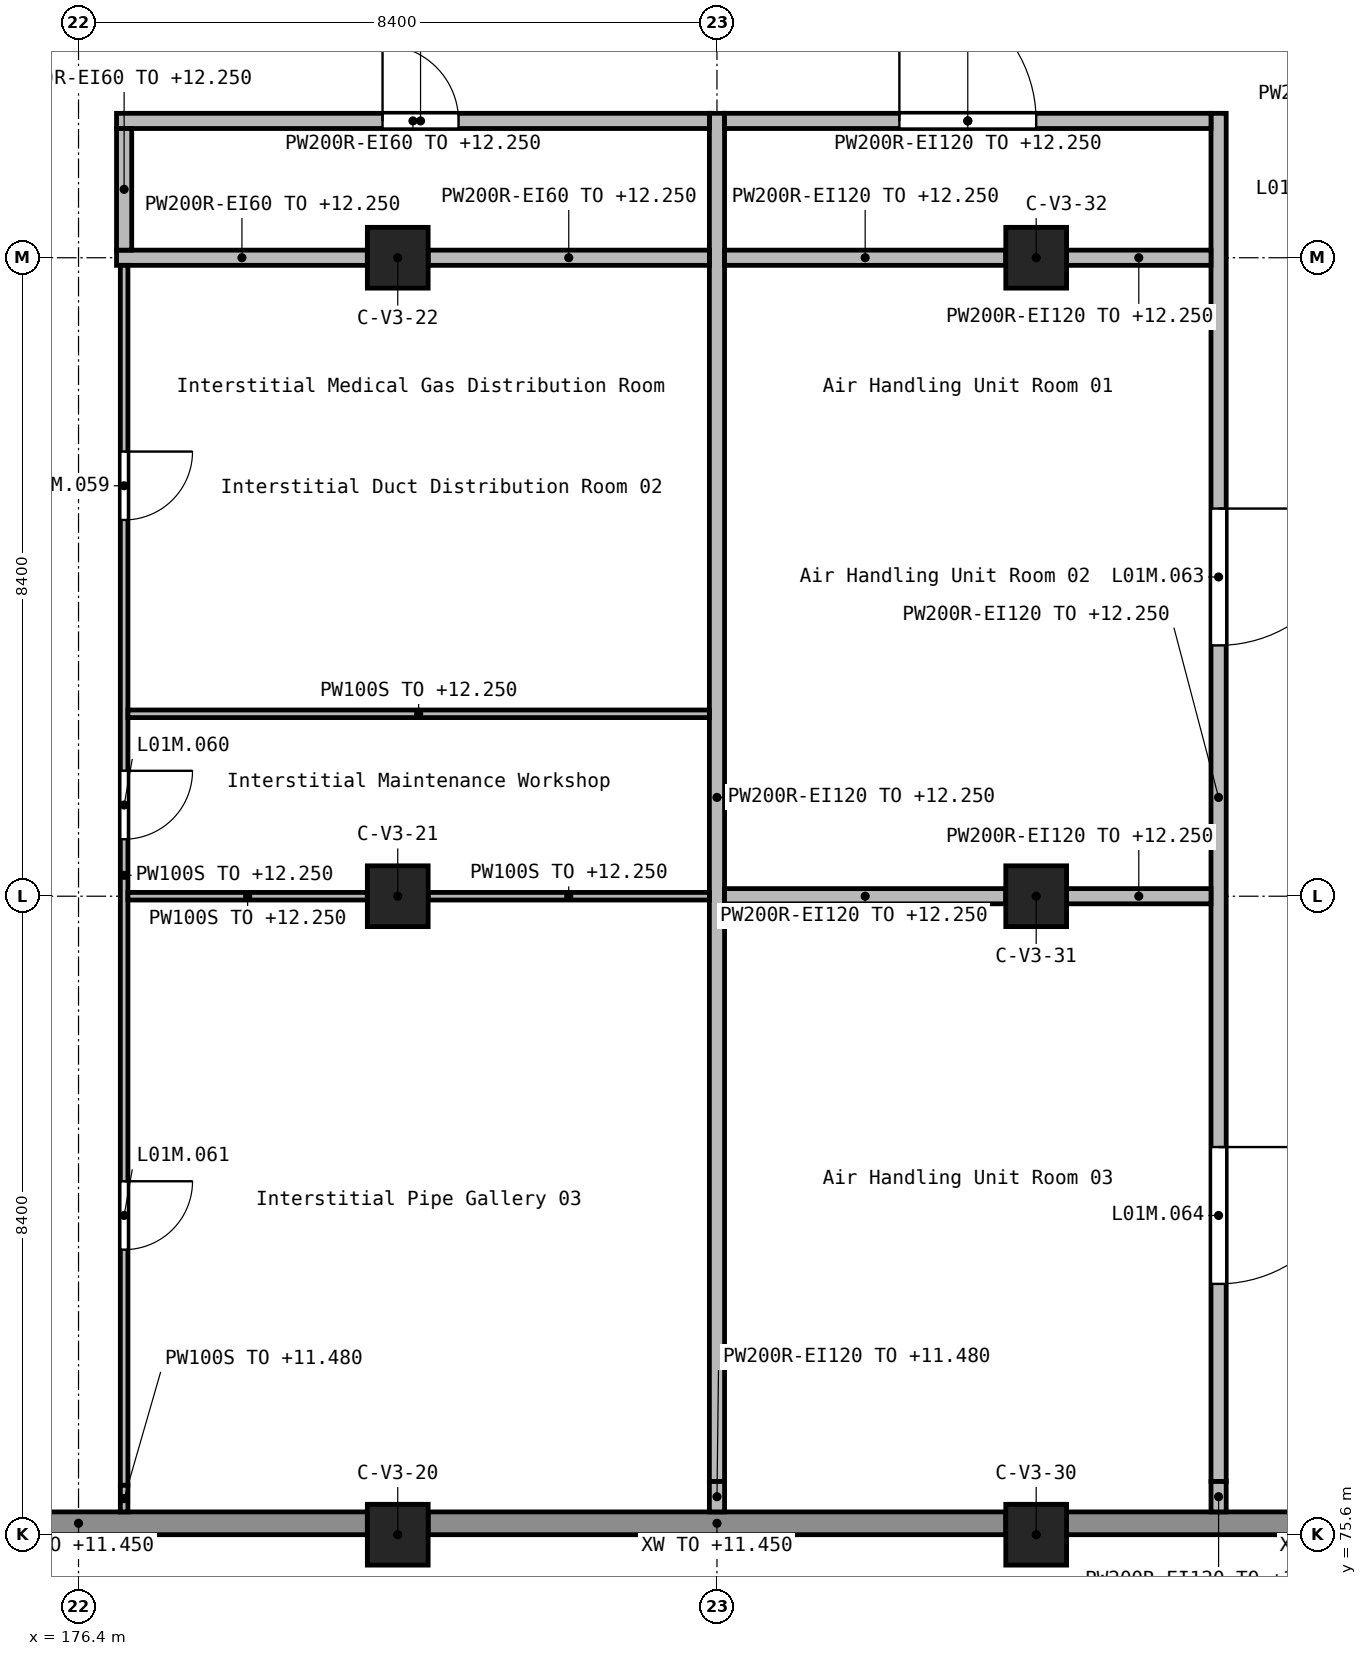
"""IFC4 building model, lengths in metres.
Left out: names, types, materials, properties, quantities, classifications, styles, units other than length and angle.
Written with IfcOpenShell. Run it as: python <this file> out.ifc"""

import sys

from ifc_helpers import new_model, si_unit, direction, frame, frame_2d, origin, origin_2d, place, context, subcontext, project, spatial, rectangle, extrude, element, fill, save


model = new_model("IFC4")
c1 = context("Model", 3, precision=1e-05, world=origin(), true_north=direction((0.0, 1.0)))
c2 = subcontext(c1, "Body", "Model", "MODEL_VIEW")
j1 = project(units=[si_unit("LENGTHUNIT", "METRE"), si_unit("PLANEANGLEUNIT", "RADIAN")], contexts=[c1])
p1 = place(None, origin())
s1 = spatial("IfcSite", under=j1, at=p1, CompositionType="ELEMENT")
p2 = place(p1, origin())
s2 = spatial("IfcBuilding", under=s1, at=p2, CompositionType="ELEMENT")
p3 = place(p2, frame((0.0, 0.0, 9.9)))
s3 = spatial("IfcBuildingStorey", under=s2, at=p3, CompositionType="ELEMENT", Elevation=9.9)
for number, where, z_axis, x_axis in (
    (1, (180.6, 75.6, 0.0), (0.0, 0.0, 1.0), (1.0, 0.0, 0.0)),
    (2, (180.6, 84.0, 0.0), (0.0, 0.0, 1.0), (1.0, 0.0, 0.0)),
    (3, (180.6, 92.4, 0.0), (0.0, 0.0, 1.0), (1.0, 0.0, 0.0)),
    (4, (189.0, 75.6, 0.0), (0.0, 0.0, 1.0), (1.0, 0.0, 0.0)),
    (5, (189.0, 84.0, 0.0), (0.0, 0.0, 1.0), (1.0, 0.0, 0.0)),
    (6, (189.0, 92.4, 0.0), (0.0, 0.0, 1.0), (1.0, 0.0, 0.0)),
):
    element("IfcColumn", number, at=place(p3, frame(where, z_axis=z_axis, x_axis=x_axis)), inside=s3, PredefinedType="COLUMN", context=c2, shape_type="SweptSolid", body=[
        extrude(rectangle(XDim=0.8, YDim=0.8, at=origin_2d()), origin(), (0.0, 0.0, 1.0), 2.7),
    ])
p4 = place(p3, frame((172.6, 75.75, 0.0), z_axis=(0.0, 0.0, 1.0), x_axis=(1.0, 0.0, 0.0)))
e7 = element("IfcWall", 7, at=p4, inside=s3, PredefinedType="STANDARD", context=c2, shape_type="SweptSolid", body=[
    extrude(rectangle(XDim=7.6, YDim=0.3, at=frame_2d((3.8, 0.0))), origin(), (0.0, 0.0, 1.0), 1.55),
])
for number, where, z_axis, x_axis in (
    (8, (181.0, 75.75, 0.0), (0.0, 0.0, 1.0), (1.0, 0.0, 0.0)),
    (9, (189.4, 75.75, 0.0), (0.0, 0.0, 1.0), (1.0, 0.0, 0.0)),
):
    element("IfcWall", number, at=place(p3, frame(where, z_axis=z_axis, x_axis=x_axis)), inside=s3, PredefinedType="STANDARD", context=c2, shape_type="SweptSolid", body=[
        extrude(rectangle(XDim=7.6, YDim=0.3, at=frame_2d((3.8, 0.0))), origin(), (0.0, 0.0, 1.0), 1.55),
    ])
p5 = place(p3, frame((184.8, 94.3, 0.0), z_axis=(0.0, 0.0, 1.0), x_axis=(0.0, -1.0, 0.0)))
e10 = element("IfcWall", 10, at=p5, inside=s3, PredefinedType="SOLIDWALL", context=c2, shape_type="SweptSolid", body=[
    extrude(rectangle(XDim=18.0, YDim=0.2, at=frame_2d((9.0, 0.0))), origin(), (0.0, 0.0, 1.0), 2.35),
])
p6 = place(p3, frame((184.8, 76.3, 0.0), z_axis=(0.0, 0.0, 1.0), x_axis=(0.0, -1.0, 0.0)))
e11 = element("IfcWall", 11, at=p6, inside=s3, PredefinedType="SOLIDWALL", context=c2, shape_type="SweptSolid", body=[
    extrude(rectangle(XDim=0.4, YDim=0.2, at=frame_2d((0.2, 0.0))), origin(), (0.0, 0.0, 1.0), 1.58),
])
p7 = place(p3, frame((191.4, 94.3, 0.0), z_axis=(0.0, 0.0, 1.0), x_axis=(0.0, -1.0, 0.0)))
e12 = element("IfcWall", 12, at=p7, inside=s3, PredefinedType="SOLIDWALL", context=c2, shape_type="SweptSolid", body=[
    extrude(rectangle(XDim=18.0, YDim=0.2, at=frame_2d((9.0, 0.0))), origin(), (0.0, 0.0, 1.0), 2.35),
])
p8 = place(p7, frame((5.2, 0.0, 0.0)))
e13 = element("IfcOpeningElement", 13, at=p8, cuts=e12, PredefinedType="OPENING", context=c2, shape_type="SweptSolid", body=[
    extrude(rectangle(XDim=1.8, YDim=2.1, at=frame_2d((0.9, 1.05))), frame((0.0, 0.11, 0.0), z_axis=(0.0, -1.0, 0.0), x_axis=(1.0, 0.0, 0.0)), (0.0, 0.0, 1.0), 0.22),
])
p9 = place(p7, frame((13.6, 0.0, 0.0)))
e14 = element("IfcOpeningElement", 14, at=p9, cuts=e12, PredefinedType="OPENING", context=c2, shape_type="SweptSolid", body=[
    extrude(rectangle(XDim=1.8, YDim=2.1, at=frame_2d((0.9, 1.05))), frame((0.0, 0.11, 0.0), z_axis=(0.0, -1.0, 0.0), x_axis=(1.0, 0.0, 0.0)), (0.0, 0.0, 1.0), 0.22),
])
p10 = place(p3, frame((191.4, 76.3, 0.0), z_axis=(0.0, 0.0, 1.0), x_axis=(0.0, -1.0, 0.0)))
e15 = element("IfcWall", 15, at=p10, inside=s3, PredefinedType="SOLIDWALL", context=c2, shape_type="SweptSolid", body=[
    extrude(rectangle(XDim=0.4, YDim=0.2, at=frame_2d((0.2, 0.0))), origin(), (0.0, 0.0, 1.0), 1.58),
])
p11 = place(p3, frame((176.9, 92.4, 0.0), z_axis=(0.0, 0.0, 1.0), x_axis=(1.0, 0.0, 0.0)))
e16 = element("IfcWall", 16, at=p11, inside=s3, PredefinedType="SOLIDWALL", context=c2, shape_type="SweptSolid", body=[
    extrude(rectangle(XDim=3.3, YDim=0.2, at=frame_2d((1.65, 0.0))), origin(), (0.0, 0.0, 1.0), 2.35),
])
p12 = place(p3, frame((181.0, 92.4, 0.0), z_axis=(0.0, 0.0, 1.0), x_axis=(1.0, 0.0, 0.0)))
e17 = element("IfcWall", 17, at=p12, inside=s3, PredefinedType="SOLIDWALL", context=c2, shape_type="SweptSolid", body=[
    extrude(rectangle(XDim=3.7, YDim=0.2, at=frame_2d((1.85, 0.0))), origin(), (0.0, 0.0, 1.0), 2.35),
])
p13 = place(p3, frame((176.9, 94.2, 0.0), z_axis=(0.0, 0.0, 1.0), x_axis=(1.0, 0.0, 0.0)))
e18 = element("IfcWall", 18, at=p13, inside=s3, PredefinedType="SOLIDWALL", context=c2, shape_type="SweptSolid", body=[
    extrude(rectangle(XDim=7.8, YDim=0.2, at=frame_2d((3.9, 0.0))), origin(), (0.0, 0.0, 1.0), 2.35),
])
p14 = place(p13, frame((3.5, 0.0, 0.0)))
e19 = element("IfcOpeningElement", 19, at=p14, cuts=e18, PredefinedType="OPENING", context=c2, shape_type="SweptSolid", body=[
    extrude(rectangle(XDim=1.0, YDim=2.1, at=frame_2d((0.5, 1.05))), frame((0.0, 0.11, 0.0), z_axis=(0.0, -1.0, 0.0), x_axis=(1.0, 0.0, 0.0)), (0.0, 0.0, 1.0), 0.22),
])
p15 = place(p3, frame((184.9, 84.0, 0.0), z_axis=(0.0, 0.0, 1.0), x_axis=(1.0, 0.0, 0.0)))
e20 = element("IfcWall", 20, at=p15, inside=s3, PredefinedType="SOLIDWALL", context=c2, shape_type="SweptSolid", body=[
    extrude(rectangle(XDim=3.7, YDim=0.2, at=frame_2d((1.85, 0.0))), origin(), (0.0, 0.0, 1.0), 2.35),
])
p16 = place(p3, frame((189.4, 84.0, 0.0), z_axis=(0.0, 0.0, 1.0), x_axis=(1.0, 0.0, 0.0)))
e21 = element("IfcWall", 21, at=p16, inside=s3, PredefinedType="SOLIDWALL", context=c2, shape_type="SweptSolid", body=[
    extrude(rectangle(XDim=1.9, YDim=0.2, at=frame_2d((0.95, 0.0))), origin(), (0.0, 0.0, 1.0), 2.35),
])
p17 = place(p3, frame((184.9, 92.4, 0.0), z_axis=(0.0, 0.0, 1.0), x_axis=(1.0, 0.0, 0.0)))
e22 = element("IfcWall", 22, at=p17, inside=s3, PredefinedType="SOLIDWALL", context=c2, shape_type="SweptSolid", body=[
    extrude(rectangle(XDim=3.7, YDim=0.2, at=frame_2d((1.85, 0.0))), origin(), (0.0, 0.0, 1.0), 2.35),
])
p18 = place(p3, frame((189.4, 92.4, 0.0), z_axis=(0.0, 0.0, 1.0), x_axis=(1.0, 0.0, 0.0)))
e23 = element("IfcWall", 23, at=p18, inside=s3, PredefinedType="SOLIDWALL", context=c2, shape_type="SweptSolid", body=[
    extrude(rectangle(XDim=1.9, YDim=0.2, at=frame_2d((0.95, 0.0))), origin(), (0.0, 0.0, 1.0), 2.35),
])
p19 = place(p3, frame((184.9, 94.2, 0.0), z_axis=(0.0, 0.0, 1.0), x_axis=(1.0, 0.0, 0.0)))
e24 = element("IfcWall", 24, at=p19, inside=s3, PredefinedType="SOLIDWALL", context=c2, shape_type="SweptSolid", body=[
    extrude(rectangle(XDim=6.4, YDim=0.2, at=frame_2d((3.2, 0.0))), origin(), (0.0, 0.0, 1.0), 2.35),
])
p20 = place(p19, frame((2.3, 0.0, 0.0)))
e25 = element("IfcOpeningElement", 25, at=p20, cuts=e24, PredefinedType="OPENING", context=c2, shape_type="SweptSolid", body=[
    extrude(rectangle(XDim=1.8, YDim=2.1, at=frame_2d((0.9, 1.05))), frame((0.0, 0.11, 0.0), z_axis=(0.0, -1.0, 0.0), x_axis=(1.0, 0.0, 0.0)), (0.0, 0.0, 1.0), 0.22),
])
p21 = place(p3, frame((177.0, 92.5, 0.0), z_axis=(0.0, 0.0, 1.0), x_axis=(0.0, 1.0, 0.0)))
e26 = element("IfcWall", 26, at=p21, inside=s3, PredefinedType="SOLIDWALL", context=c2, shape_type="SweptSolid", body=[
    extrude(rectangle(XDim=1.6, YDim=0.2, at=frame_2d((0.8, 0.0))), origin(), (0.0, 0.0, 1.0), 2.35),
])
p22 = place(p3, frame((177.0, 92.3, 0.0), z_axis=(0.0, 0.0, 1.0), x_axis=(0.0, -1.0, 0.0)))
e27 = element("IfcWall", 27, at=p22, inside=s3, PredefinedType="PARTITIONING", context=c2, shape_type="SweptSolid", body=[
    extrude(rectangle(XDim=16.05, YDim=0.1, at=frame_2d((8.025, 0.0))), origin(), (0.0, 0.0, 1.0), 2.35),
])
p23 = place(p22, frame((2.45, 0.0, 0.0)))
e28 = element("IfcOpeningElement", 28, at=p23, cuts=e27, PredefinedType="OPENING", context=c2, shape_type="SweptSolid", body=[
    extrude(rectangle(XDim=0.9, YDim=2.1, at=frame_2d((0.45, 1.05))), frame((0.0, 0.06, 0.0), z_axis=(0.0, -1.0, 0.0), x_axis=(1.0, 0.0, 0.0)), (0.0, 0.0, 1.0), 0.12),
])
p24 = place(p22, frame((6.65, 0.0, 0.0)))
e29 = element("IfcOpeningElement", 29, at=p24, cuts=e27, PredefinedType="OPENING", context=c2, shape_type="SweptSolid", body=[
    extrude(rectangle(XDim=0.9, YDim=2.1, at=frame_2d((0.45, 1.05))), frame((0.0, 0.06, 0.0), z_axis=(0.0, -1.0, 0.0), x_axis=(1.0, 0.0, 0.0)), (0.0, 0.0, 1.0), 0.12),
])
p25 = place(p22, frame((12.05, 0.0, 0.0)))
e30 = element("IfcOpeningElement", 30, at=p25, cuts=e27, PredefinedType="OPENING", context=c2, shape_type="SweptSolid", body=[
    extrude(rectangle(XDim=0.9, YDim=2.1, at=frame_2d((0.45, 1.05))), frame((0.0, 0.06, 0.0), z_axis=(0.0, -1.0, 0.0), x_axis=(1.0, 0.0, 0.0)), (0.0, 0.0, 1.0), 0.12),
])
p26 = place(p3, frame((177.0, 76.25, 0.0), z_axis=(0.0, 0.0, 1.0), x_axis=(0.0, -1.0, 0.0)))
e31 = element("IfcWall", 31, at=p26, inside=s3, PredefinedType="PARTITIONING", context=c2, shape_type="SweptSolid", body=[
    extrude(rectangle(XDim=0.35, YDim=0.1, at=frame_2d((0.175, 0.0))), origin(), (0.0, 0.0, 1.0), 1.58),
])
p27 = place(p3, frame((177.05, 84.0, 0.0), z_axis=(0.0, 0.0, 1.0), x_axis=(1.0, 0.0, 0.0)))
e32 = element("IfcWall", 32, at=p27, inside=s3, PredefinedType="PARTITIONING", context=c2, shape_type="SweptSolid", body=[
    extrude(rectangle(XDim=3.15, YDim=0.1, at=frame_2d((1.575, 0.0))), origin(), (0.0, 0.0, 1.0), 2.35),
])
p28 = place(p3, frame((181.0, 84.0, 0.0), z_axis=(0.0, 0.0, 1.0), x_axis=(1.0, 0.0, 0.0)))
e33 = element("IfcWall", 33, at=p28, inside=s3, PredefinedType="PARTITIONING", context=c2, shape_type="SweptSolid", body=[
    extrude(rectangle(XDim=3.7, YDim=0.1, at=frame_2d((1.85, 0.0))), origin(), (0.0, 0.0, 1.0), 2.35),
])
p29 = place(p3, frame((177.05, 86.4, 0.0), z_axis=(0.0, 0.0, 1.0), x_axis=(1.0, 0.0, 0.0)))
e34 = element("IfcWall", 34, at=p29, inside=s3, PredefinedType="PARTITIONING", context=c2, shape_type="SweptSolid", body=[
    extrude(rectangle(XDim=7.65, YDim=0.1, at=frame_2d((3.825, 0.0))), origin(), (0.0, 0.0, 1.0), 2.35),
])
p30 = place(p14, frame((1.0, 0.0, 0.0), z_axis=(0.0, 0.0, 1.0), x_axis=(-1.0, 0.0, 0.0)))
e35 = element("IfcDoor", 35, at=p30, inside=s3, OperationType="SINGLE_SWING_LEFT", PredefinedType="DOOR", context=c2, shape_type="SweptSolid", body=[
    extrude(rectangle(XDim=1.0, YDim=2.1, at=frame_2d((0.5, 1.05))), frame((0.0, 0.025, 0.0), z_axis=(0.0, -1.0, 0.0), x_axis=(1.0, 0.0, 0.0)), (0.0, 0.0, 1.0), 0.05),
])
fill(e19, e35)
p31 = place(p23, origin())
e36 = element("IfcDoor", 36, at=p31, inside=s3, OperationType="SINGLE_SWING_LEFT", PredefinedType="DOOR", context=c2, shape_type="SweptSolid", body=[
    extrude(rectangle(XDim=0.9, YDim=2.1, at=frame_2d((0.45, 1.05))), frame((0.0, 0.025, 0.0), z_axis=(0.0, -1.0, 0.0), x_axis=(1.0, 0.0, 0.0)), (0.0, 0.0, 1.0), 0.05),
])
fill(e28, e36)
p32 = place(p24, origin())
e37 = element("IfcDoor", 37, at=p32, inside=s3, OperationType="SINGLE_SWING_LEFT", PredefinedType="DOOR", context=c2, shape_type="SweptSolid", body=[
    extrude(rectangle(XDim=0.9, YDim=2.1, at=frame_2d((0.45, 1.05))), frame((0.0, 0.025, 0.0), z_axis=(0.0, -1.0, 0.0), x_axis=(1.0, 0.0, 0.0)), (0.0, 0.0, 1.0), 0.05),
])
fill(e29, e37)
p33 = place(p25, origin())
e38 = element("IfcDoor", 38, at=p33, inside=s3, OperationType="SINGLE_SWING_RIGHT", PredefinedType="DOOR", context=c2, shape_type="SweptSolid", body=[
    extrude(rectangle(XDim=0.9, YDim=2.1, at=frame_2d((0.45, 1.05))), frame((0.0, 0.025, 0.0), z_axis=(0.0, -1.0, 0.0), x_axis=(1.0, 0.0, 0.0)), (0.0, 0.0, 1.0), 0.05),
])
fill(e30, e38)
p34 = place(p20, frame((1.8, 0.0, 0.0), z_axis=(0.0, 0.0, 1.0), x_axis=(-1.0, 0.0, 0.0)))
e39 = element("IfcDoor", 39, at=p34, inside=s3, OperationType="DOUBLE_DOOR_SINGLE_SWING", PredefinedType="DOOR", context=c2, shape_type="SweptSolid", body=[
    extrude(rectangle(XDim=1.8, YDim=2.1, at=frame_2d((0.9, 1.05))), frame((0.0, 0.025, 0.0), z_axis=(0.0, -1.0, 0.0), x_axis=(1.0, 0.0, 0.0)), (0.0, 0.0, 1.0), 0.05),
])
fill(e25, e39)
p35 = place(p8, frame((1.8, 0.0, 0.0), z_axis=(0.0, 0.0, 1.0), x_axis=(-1.0, 0.0, 0.0)))
e40 = element("IfcDoor", 40, at=p35, inside=s3, OperationType="DOUBLE_DOOR_SINGLE_SWING", PredefinedType="DOOR", context=c2, shape_type="SweptSolid", body=[
    extrude(rectangle(XDim=1.8, YDim=2.1, at=frame_2d((0.9, 1.05))), frame((0.0, 0.025, 0.0), z_axis=(0.0, -1.0, 0.0), x_axis=(1.0, 0.0, 0.0)), (0.0, 0.0, 1.0), 0.05),
])
fill(e13, e40)
p36 = place(p9, frame((1.8, 0.0, 0.0), z_axis=(0.0, 0.0, 1.0), x_axis=(-1.0, 0.0, 0.0)))
e41 = element("IfcDoor", 41, at=p36, inside=s3, OperationType="DOUBLE_DOOR_SINGLE_SWING", PredefinedType="DOOR", context=c2, shape_type="SweptSolid", body=[
    extrude(rectangle(XDim=1.8, YDim=2.1, at=frame_2d((0.9, 1.05))), frame((0.0, 0.025, 0.0), z_axis=(0.0, -1.0, 0.0), x_axis=(1.0, 0.0, 0.0)), (0.0, 0.0, 1.0), 0.05),
])
fill(e14, e41)
save(model, sys.argv[1])
